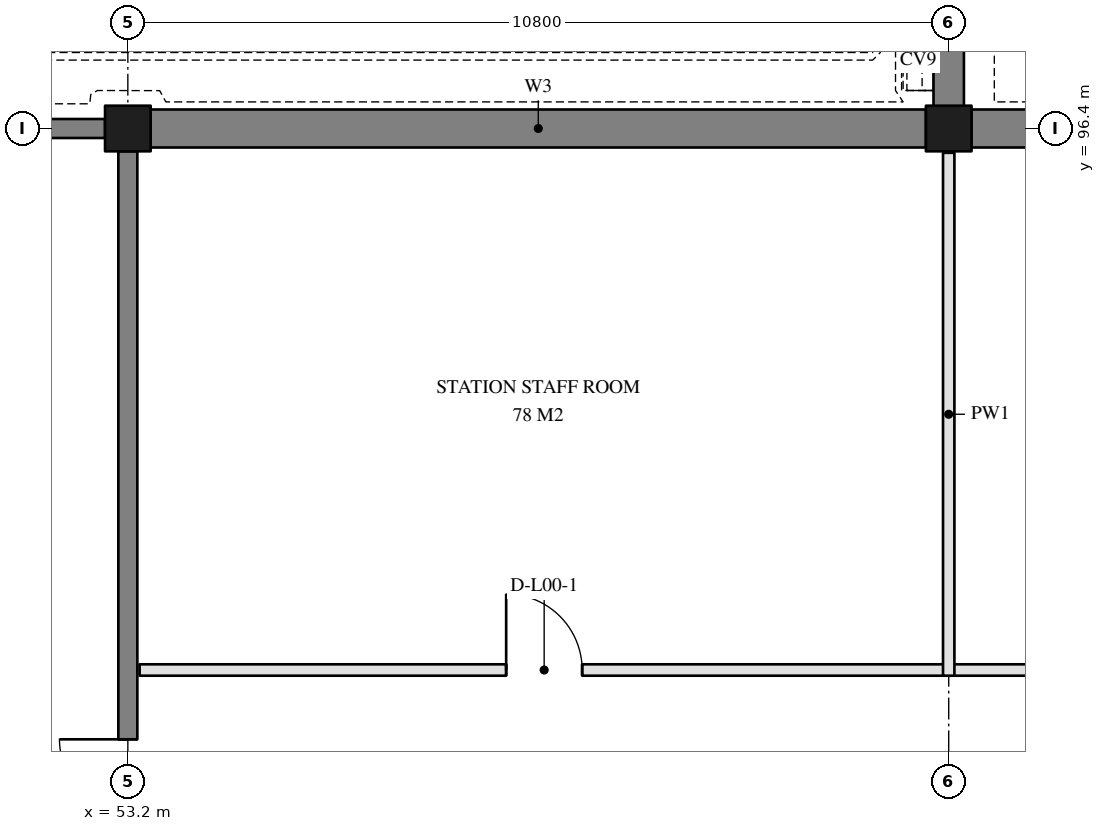
"""IFC4 building model, lengths in metres.
Left out: names, types, materials, properties, quantities, classifications, styles, units other than length and angle.
Written with IfcOpenShell. Run it as: python <this file> out.ifc"""

import sys

from ifc_helpers import new_model, si_unit, direction, frame, frame_2d, origin, origin_2d, place, context, subcontext, project, spatial, rectangle, extrude, element, fill, save


model = new_model("IFC4")
c1 = context("Model", 3, precision=1e-05, world=origin(), true_north=direction((0.0, 1.0)))
c2 = subcontext(c1, "Body", "Model", "MODEL_VIEW")
j1 = project(units=[si_unit("LENGTHUNIT", "METRE"), si_unit("PLANEANGLEUNIT", "RADIAN")], contexts=[c1])
p1 = place(None, origin())
s1 = spatial("IfcSite", under=j1, at=p1, CompositionType="ELEMENT")
p2 = place(p1, origin())
s2 = spatial("IfcBuilding", under=s1, at=p2, CompositionType="ELEMENT")
p3 = place(p2, origin())
s3 = spatial("IfcBuildingStorey", under=s2, at=p3, CompositionType="ELEMENT", Elevation=0.0)
for number, where, z_axis, x_axis in (
    (1, (53.2, 96.4, -1.8), (0.0, 0.0, 1.0), (1.0, 0.0, 0.0)),
    (2, (64.0, 96.4, -1.8), (0.0, 0.0, 1.0), (1.0, 0.0, 0.0)),
):
    element("IfcColumn", number, at=place(p3, frame(where, z_axis=z_axis, x_axis=x_axis)), inside=s3, PredefinedType="COLUMN", context=c2, shape_type="SweptSolid", body=[
        extrude(rectangle(XDim=0.6, YDim=0.6, at=origin_2d()), origin(), (0.0, 0.0, 1.0), 6.6),
    ])
p4 = place(p3, frame((53.2, 85.93, 0.0), z_axis=(0.0, 0.0, 1.0), x_axis=(0.0, 1.0, 0.0)))
e3 = element("IfcWall", 3, at=p4, inside=s3, PredefinedType="SOLIDWALL", context=c2, shape_type="SweptSolid", body=[
    extrude(rectangle(XDim=10.17, YDim=0.25, at=frame_2d((5.085, 0.0))), origin(), (0.0, 0.0, 1.0), 4.8),
])
p5 = place(p4, frame((0.633, 0.0, 0.0)))
e4 = element("IfcOpeningElement", 4, at=p5, cuts=e3, PredefinedType="OPENING", context=c2, shape_type="SweptSolid", body=[
    extrude(rectangle(XDim=1.8, YDim=2.1, at=frame_2d((0.9, 1.05))), frame((0.0, 0.135, 0.0), z_axis=(0.0, -1.0, 0.0), x_axis=(1.0, 0.0, 0.0)), (0.0, 0.0, 1.0), 0.27),
])
p6 = place(p3, frame((52.9, 96.4, 0.0), z_axis=(0.0, 0.0, 1.0), x_axis=(-1.0, 0.0, 0.0)))
e5 = element("IfcWall", 5, at=p6, inside=s3, PredefinedType="SOLIDWALL", context=c2, shape_type="SweptSolid", body=[
    extrude(rectangle(XDim=10.2, YDim=0.25, at=frame_2d((5.1, 0.0))), origin(), (0.0, 0.0, 1.0), 4.8),
])
p7 = place(p3, frame((64.0, 96.6, 0.0), z_axis=(0.0, 0.0, 1.0), x_axis=(0.0, 1.0, 0.0)))
e6 = element("IfcWall", 6, at=p7, inside=s3, PredefinedType="SOLIDWALL", context=c2, shape_type="SweptSolid", body=[
    extrude(rectangle(XDim=21.2, YDim=0.4, at=frame_2d((10.6, 0.0))), origin(), (0.0, 0.0, 1.0), 4.4),
])
for number, where, z_axis, x_axis in (
    (7, (53.5, 96.4, 0.0), (0.0, 0.0, 1.0), (1.0, 0.0, 0.0)),
    (8, (64.3, 96.4, 0.0), (0.0, 0.0, 1.0), (1.0, 0.0, 0.0)),
):
    element("IfcWall", number, at=place(p3, frame(where, z_axis=z_axis, x_axis=x_axis)), inside=s3, PredefinedType="SOLIDWALL", context=c2, shape_type="SweptSolid", body=[
        extrude(rectangle(XDim=10.2, YDim=0.5, at=frame_2d((5.1, 0.0))), origin(), (0.0, 0.0, 1.0), 3.5),
    ])
p8 = place(p3, frame((53.355, 89.275, 0.0), z_axis=(0.0, 0.0, 1.0), x_axis=(1.0, 0.0, 0.0)))
e9 = element("IfcWall", 9, at=p8, inside=s3, PredefinedType="PARTITIONING", context=c2, shape_type="SweptSolid", body=[
    extrude(rectangle(XDim=10.645, YDim=0.15, at=frame_2d((5.323, 0.0))), origin(), (0.0, 0.0, 1.0), 3.5),
])
p9 = place(p8, frame((4.823, 0.0, 0.0)))
e10 = element("IfcOpeningElement", 10, at=p9, cuts=e9, PredefinedType="OPENING", context=c2, shape_type="SweptSolid", body=[
    extrude(rectangle(XDim=1.0, YDim=2.1, at=frame_2d((0.5, 1.05))), frame((0.0, 0.085, 0.0), z_axis=(0.0, -1.0, 0.0), x_axis=(1.0, 0.0, 0.0)), (0.0, 0.0, 1.0), 0.17),
])
p10 = place(p3, frame((64.0, 89.275, 0.0), z_axis=(0.0, 0.0, 1.0), x_axis=(1.0, 0.0, 0.0)))
e11 = element("IfcWall", 11, at=p10, inside=s3, PredefinedType="PARTITIONING", context=c2, shape_type="SweptSolid", body=[
    extrude(rectangle(XDim=9.0, YDim=0.15, at=frame_2d((4.5, 0.0))), origin(), (0.0, 0.0, 1.0), 3.5),
])
p11 = place(p10, frame((4.0, 0.0, 0.0)))
e12 = element("IfcOpeningElement", 12, at=p11, cuts=e11, PredefinedType="OPENING", context=c2, shape_type="SweptSolid", body=[
    extrude(rectangle(XDim=1.0, YDim=2.1, at=frame_2d((0.5, 1.05))), frame((0.0, 0.085, 0.0), z_axis=(0.0, -1.0, 0.0), x_axis=(1.0, 0.0, 0.0)), (0.0, 0.0, 1.0), 0.17),
])
p12 = place(p3, frame((64.0, 89.2, 0.0), z_axis=(0.0, 0.0, 1.0), x_axis=(0.0, 1.0, 0.0)))
e13 = element("IfcWall", 13, at=p12, inside=s3, PredefinedType="PARTITIONING", context=c2, shape_type="SweptSolid", body=[
    extrude(rectangle(XDim=6.88, YDim=0.15, at=frame_2d((3.44, 0.0))), origin(), (0.0, 0.0, 1.0), 3.5),
])
p13 = place(p5, frame((1.8, 0.0, 0.0), z_axis=(0.0, 0.0, 1.0), x_axis=(-1.0, 0.0, 0.0)))
e14 = element("IfcDoor", 14, at=p13, inside=s3, OperationType="DOUBLE_DOOR_DOUBLE_SWING", PredefinedType="DOOR", context=c2, shape_type="SweptSolid", body=[
    extrude(rectangle(XDim=1.8, YDim=2.1, at=frame_2d((0.9, 1.05))), frame((0.0, 0.025, 0.0), z_axis=(0.0, -1.0, 0.0), x_axis=(1.0, 0.0, 0.0)), (0.0, 0.0, 1.0), 0.05),
])
fill(e4, e14)
p14 = place(p9, origin())
e15 = element("IfcDoor", 15, at=p14, inside=s3, OperationType="SINGLE_SWING_LEFT", PredefinedType="DOOR", context=c2, shape_type="SweptSolid", body=[
    extrude(rectangle(XDim=1.0, YDim=2.1, at=frame_2d((0.5, 1.05))), frame((0.0, 0.025, 0.0), z_axis=(0.0, -1.0, 0.0), x_axis=(1.0, 0.0, 0.0)), (0.0, 0.0, 1.0), 0.05),
])
fill(e10, e15)
save(model, sys.argv[1])
